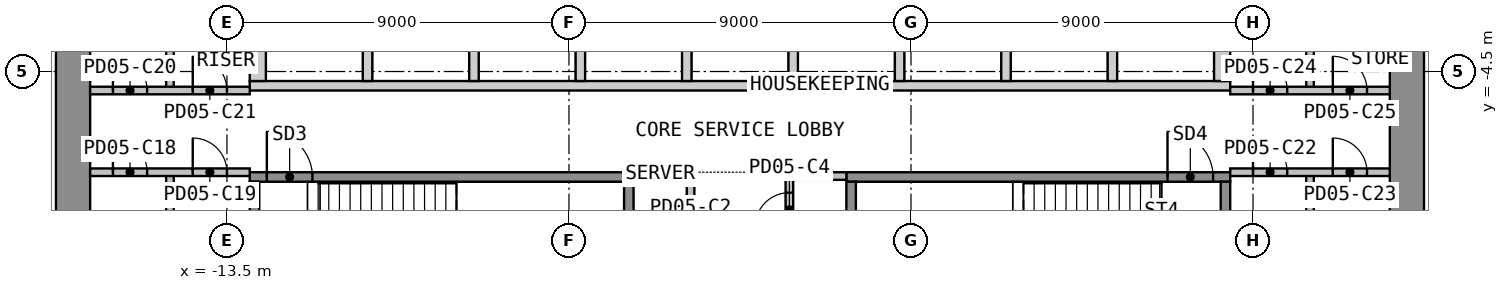
"""IFC4 building model, lengths in metres.
Left out: names, types, materials, properties, quantities, classifications, styles, units other than length and angle.
Written with IfcOpenShell. Run it as: python <this file> out.ifc"""

import sys

from ifc_helpers import new_model, si_unit, direction, frame, frame_2d, origin, place, context, subcontext, project, spatial, polyline, rectangle, outline, extrude, element, fill, save


model = new_model("IFC4")
c1 = context("Model", 3, precision=1e-05, world=origin(), true_north=direction((0.0, 1.0)))
c2 = subcontext(c1, "Body", "Model", "MODEL_VIEW")
j1 = project(units=[si_unit("LENGTHUNIT", "METRE"), si_unit("PLANEANGLEUNIT", "RADIAN")], contexts=[c1])
p1 = place(None, origin())
s1 = spatial("IfcSite", under=j1, at=p1, CompositionType="ELEMENT")
p2 = place(p1, origin())
s2 = spatial("IfcBuilding", under=s1, at=p2, CompositionType="ELEMENT")
p3 = place(p2, frame((0.0, 0.0, 25.2)))
s3 = spatial("IfcBuildingStorey", under=s2, at=p3, CompositionType="ELEMENT", Elevation=25.2)
p4 = place(p3, frame((-17.55, -12.6, 0.0), z_axis=(0.0, 0.0, 1.0), x_axis=(0.0, 1.0, 0.0)))
e1 = element("IfcWall", 1, at=p4, inside=s3, PredefinedType="SHEAR", context=c2, shape_type="SweptSolid", body=[
    extrude(rectangle(XDim=25.2, YDim=0.9, at=frame_2d((12.6, 0.0))), origin(), (0.0, 0.0, 1.0), 4.425),
])
p5 = place(p4, frame((11.4, 0.0, 0.0)))
e2 = element("IfcOpeningElement", 2, at=p5, cuts=e1, PredefinedType="OPENING", context=c2, shape_type="SweptSolid", body=[
    extrude(rectangle(XDim=2.4, YDim=2.1, at=frame_2d((1.2, 1.05))), frame((0.0, 0.46, 0.0), z_axis=(0.0, -1.0, 0.0), x_axis=(1.0, 0.0, 0.0)), (0.0, 0.0, 1.0), 0.92),
])
p6 = place(p3, frame((17.55, -12.6, 0.0), z_axis=(0.0, 0.0, 1.0), x_axis=(0.0, 1.0, 0.0)))
e3 = element("IfcWall", 3, at=p6, inside=s3, PredefinedType="SHEAR", context=c2, shape_type="SweptSolid", body=[
    extrude(rectangle(XDim=25.2, YDim=0.9, at=frame_2d((12.6, 0.0))), origin(), (0.0, 0.0, 1.0), 4.425),
])
p7 = place(p6, frame((11.4, 0.0, 0.0)))
e4 = element("IfcOpeningElement", 4, at=p7, cuts=e3, PredefinedType="OPENING", context=c2, shape_type="SweptSolid", body=[
    extrude(rectangle(XDim=2.4, YDim=2.1, at=frame_2d((1.2, 1.05))), frame((0.0, 0.46, 0.0), z_axis=(0.0, -1.0, 0.0), x_axis=(1.0, 0.0, 0.0)), (0.0, 0.0, 1.0), 0.92),
])
p8 = place(p3, origin())
e5 = element("IfcWall", 5, at=p8, inside=s3, PredefinedType="SHEAR", context=c2, shape_type="SweptSolid", body=[
    extrude(outline(polyline([(-12.9, -5.0), (12.9, -5.0), (12.9, -4.75), (-12.9, -4.75), (-12.9, -5.0)])), origin(), (0.0, 0.0, 1.0), 4.425),
])
p9 = place(p3, origin())
e6 = element("IfcWall", 6, at=p9, inside=s3, PredefinedType="SHEAR", context=c2, shape_type="SweptSolid", body=[
    extrude(outline(polyline([(-12.9, -4.75), (-12.475, -4.75), (-12.475, -2.05), (-12.9, -2.05), (-12.9, -4.75)])), origin(), (0.0, 0.0, 1.0), 4.425),
])
p10 = place(p3, origin())
e7 = element("IfcWall", 7, at=p10, inside=s3, PredefinedType="SHEAR", context=c2, shape_type="SweptSolid", body=[
    extrude(outline(polyline([(-9.925, -4.75), (-9.675, -4.75), (-9.675, -2.05), (-9.925, -2.05), (-9.925, -4.75)])), origin(), (0.0, 0.0, 1.0), 4.425),
])
p11 = place(p3, origin())
e8 = element("IfcWall", 8, at=p11, inside=s3, PredefinedType="SHEAR", context=c2, shape_type="SweptSolid", body=[
    extrude(outline(polyline([(-7.125, -4.75), (-6.875, -4.75), (-6.875, -2.05), (-7.125, -2.05), (-7.125, -4.75)])), origin(), (0.0, 0.0, 1.0), 4.425),
])
p12 = place(p3, origin())
e9 = element("IfcWall", 9, at=p12, inside=s3, PredefinedType="SHEAR", context=c2, shape_type="SweptSolid", body=[
    extrude(outline(polyline([(-4.325, -4.75), (-4.075, -4.75), (-4.075, -2.05), (-4.325, -2.05), (-4.325, -4.75)])), origin(), (0.0, 0.0, 1.0), 4.425),
])
p13 = place(p3, origin())
e10 = element("IfcWall", 10, at=p13, inside=s3, PredefinedType="SHEAR", context=c2, shape_type="SweptSolid", body=[
    extrude(outline(polyline([(-1.525, -4.75), (-1.275, -4.75), (-1.275, -2.05), (-1.525, -2.05), (-1.525, -4.75)])), origin(), (0.0, 0.0, 1.0), 4.425),
])
p14 = place(p3, origin())
e11 = element("IfcWall", 11, at=p14, inside=s3, PredefinedType="SHEAR", context=c2, shape_type="SweptSolid", body=[
    extrude(outline(polyline([(1.275, -4.75), (1.525, -4.75), (1.525, -2.05), (1.275, -2.05), (1.275, -4.75)])), origin(), (0.0, 0.0, 1.0), 4.425),
])
p15 = place(p3, origin())
e12 = element("IfcWall", 12, at=p15, inside=s3, PredefinedType="SHEAR", context=c2, shape_type="SweptSolid", body=[
    extrude(outline(polyline([(4.075, -4.75), (4.325, -4.75), (4.325, -2.05), (4.075, -2.05), (4.075, -4.75)])), origin(), (0.0, 0.0, 1.0), 4.425),
])
p16 = place(p3, origin())
e13 = element("IfcWall", 13, at=p16, inside=s3, PredefinedType="SHEAR", context=c2, shape_type="SweptSolid", body=[
    extrude(outline(polyline([(6.875, -4.75), (7.125, -4.75), (7.125, -2.05), (6.875, -2.05), (6.875, -4.75)])), origin(), (0.0, 0.0, 1.0), 4.425),
])
p17 = place(p3, origin())
e14 = element("IfcWall", 14, at=p17, inside=s3, PredefinedType="SHEAR", context=c2, shape_type="SweptSolid", body=[
    extrude(outline(polyline([(9.675, -4.75), (9.925, -4.75), (9.925, -2.05), (9.675, -2.05), (9.675, -4.75)])), origin(), (0.0, 0.0, 1.0), 4.425),
])
p18 = place(p3, origin())
e15 = element("IfcWall", 15, at=p18, inside=s3, PredefinedType="SHEAR", context=c2, shape_type="SweptSolid", body=[
    extrude(outline(polyline([(12.475, -4.75), (12.9, -4.75), (12.9, -2.05), (12.475, -2.05), (12.475, -4.75)])), origin(), (0.0, 0.0, 1.0), 4.425),
])
p19 = place(p3, frame((-12.9, -7.275, 0.0), z_axis=(0.0, 0.0, 1.0), x_axis=(1.0, 0.0, 0.0)))
e16 = element("IfcWall", 16, at=p19, inside=s3, PredefinedType="SHEAR", context=c2, shape_type="SweptSolid", body=[
    extrude(rectangle(XDim=10.1, YDim=0.25, at=frame_2d((5.05, 0.0))), origin(), (0.0, 0.0, 1.0), 4.425),
])
p20 = place(p19, frame((0.45, 0.0, 0.0)))
e17 = element("IfcOpeningElement", 17, at=p20, cuts=e16, PredefinedType="OPENING", context=c2, shape_type="SweptSolid", body=[
    extrude(rectangle(XDim=1.2, YDim=2.1, at=frame_2d((0.6, 1.05))), frame((0.0, 0.135, 0.0), z_axis=(0.0, -1.0, 0.0), x_axis=(1.0, 0.0, 0.0)), (0.0, 0.0, 1.0), 0.27),
])
for number, where, z_axis, x_axis in (
    (18, (-12.775, -10.65, 0.0), (0.0, 0.0, 1.0), (0.0, 1.0, 0.0)),
    (19, (-2.925, -10.65, 0.0), (0.0, 0.0, 1.0), (0.0, 1.0, 0.0)),
):
    element("IfcWall", number, at=place(p3, frame(where, z_axis=z_axis, x_axis=x_axis)), inside=s3, PredefinedType="SHEAR", context=c2, shape_type="SweptSolid", body=[
        extrude(rectangle(XDim=3.25, YDim=0.25, at=frame_2d((1.625, 0.0))), origin(), (0.0, 0.0, 1.0), 4.425),
    ])
p21 = place(p3, frame((2.8, -7.275, 0.0), z_axis=(0.0, 0.0, 1.0), x_axis=(1.0, 0.0, 0.0)))
e20 = element("IfcWall", 20, at=p21, inside=s3, PredefinedType="SHEAR", context=c2, shape_type="SweptSolid", body=[
    extrude(rectangle(XDim=10.1, YDim=0.25, at=frame_2d((5.05, 0.0))), origin(), (0.0, 0.0, 1.0), 4.425),
])
p22 = place(p21, frame((8.45, 0.0, 0.0)))
e21 = element("IfcOpeningElement", 21, at=p22, cuts=e20, PredefinedType="OPENING", context=c2, shape_type="SweptSolid", body=[
    extrude(rectangle(XDim=1.2, YDim=2.1, at=frame_2d((0.6, 1.05))), frame((0.0, 0.135, 0.0), z_axis=(0.0, -1.0, 0.0), x_axis=(1.0, 0.0, 0.0)), (0.0, 0.0, 1.0), 0.27),
])
for number, where, z_axis, x_axis in (
    (22, (2.925, -10.65, 0.0), (0.0, 0.0, 1.0), (0.0, 1.0, 0.0)),
    (23, (12.775, -10.65, 0.0), (0.0, 0.0, 1.0), (0.0, 1.0, 0.0)),
):
    element("IfcWall", number, at=place(p3, frame(where, z_axis=z_axis, x_axis=x_axis)), inside=s3, PredefinedType="SHEAR", context=c2, shape_type="SweptSolid", body=[
        extrude(rectangle(XDim=3.25, YDim=0.25, at=frame_2d((1.625, 0.0))), origin(), (0.0, 0.0, 1.0), 4.425),
    ])
for number, where, z_axis, x_axis in (
    (24, (-2.8, -7.25, 0.0), (0.0, 0.0, 1.0), (1.0, 0.0, 0.0)),
    (25, (1.4, -7.25, 0.0), (0.0, 0.0, 1.0), (1.0, 0.0, 0.0)),
):
    element("IfcWall", number, at=place(p3, frame(where, z_axis=z_axis, x_axis=x_axis)), inside=s3, PredefinedType="PARTITIONING", context=c2, shape_type="SweptSolid", body=[
        extrude(rectangle(XDim=1.4, YDim=0.2, at=frame_2d((0.7, 0.0))), origin(), (0.0, 0.0, 1.0), 4.425),
    ])
p23 = place(p3, frame((-1.3, -12.6, 0.0), z_axis=(0.0, 0.0, 1.0), x_axis=(0.0, 1.0, 0.0)))
e26 = element("IfcWall", 26, at=p23, inside=s3, PredefinedType="PARTITIONING", context=c2, shape_type="SweptSolid", body=[
    extrude(rectangle(XDim=5.45, YDim=0.2, at=frame_2d((2.725, 0.0))), origin(), (0.0, 0.0, 1.0), 4.425),
])
p24 = place(p23, frame((0.337, 0.0, 0.0)))
e27 = element("IfcOpeningElement", 27, at=p24, cuts=e26, PredefinedType="OPENING", context=c2, shape_type="SweptSolid", body=[
    extrude(rectangle(XDim=0.9, YDim=2.1, at=frame_2d((0.45, 1.05))), frame((0.0, 0.11, 0.0), z_axis=(0.0, -1.0, 0.0), x_axis=(1.0, 0.0, 0.0)), (0.0, 0.0, 1.0), 0.22),
])
p25 = place(p23, frame((2.962, 0.0, 0.0)))
e28 = element("IfcOpeningElement", 28, at=p25, cuts=e26, PredefinedType="OPENING", context=c2, shape_type="SweptSolid", body=[
    extrude(rectangle(XDim=0.9, YDim=2.1, at=frame_2d((0.45, 1.05))), frame((0.0, 0.11, 0.0), z_axis=(0.0, -1.0, 0.0), x_axis=(1.0, 0.0, 0.0)), (0.0, 0.0, 1.0), 0.22),
])
p26 = place(p3, frame((1.3, -12.6, 0.0), z_axis=(0.0, 0.0, 1.0), x_axis=(0.0, 1.0, 0.0)))
e29 = element("IfcWall", 29, at=p26, inside=s3, PredefinedType="PARTITIONING", context=c2, shape_type="SweptSolid", body=[
    extrude(rectangle(XDim=5.45, YDim=0.2, at=frame_2d((2.725, 0.0))), origin(), (0.0, 0.0, 1.0), 4.425),
])
p27 = place(p26, frame((1.387, 0.0, 0.0)))
e30 = element("IfcOpeningElement", 30, at=p27, cuts=e29, PredefinedType="OPENING", context=c2, shape_type="SweptSolid", body=[
    extrude(rectangle(XDim=0.9, YDim=2.1, at=frame_2d((0.45, 1.05))), frame((0.0, 0.11, 0.0), z_axis=(0.0, -1.0, 0.0), x_axis=(1.0, 0.0, 0.0)), (0.0, 0.0, 1.0), 0.22),
])
p28 = place(p26, frame((4.012, 0.0, 0.0)))
e31 = element("IfcOpeningElement", 31, at=p28, cuts=e29, PredefinedType="OPENING", context=c2, shape_type="SweptSolid", body=[
    extrude(rectangle(XDim=0.9, YDim=2.1, at=frame_2d((0.45, 1.05))), frame((0.0, 0.11, 0.0), z_axis=(0.0, -1.0, 0.0), x_axis=(1.0, 0.0, 0.0)), (0.0, 0.0, 1.0), 0.22),
])
p29 = place(p3, frame((-15.0, -12.6, 0.0), z_axis=(0.0, 0.0, 1.0), x_axis=(0.0, 1.0, 0.0)))
e32 = element("IfcWall", 32, at=p29, inside=s3, PredefinedType="PARTITIONING", context=c2, shape_type="SweptSolid", body=[
    extrude(rectangle(XDim=5.45, YDim=0.2, at=frame_2d((2.725, 0.0))), origin(), (0.0, 0.0, 1.0), 4.425),
])
p30 = place(p3, frame((-17.1, -7.15, 0.0), z_axis=(0.0, 0.0, 1.0), x_axis=(1.0, 0.0, 0.0)))
e33 = element("IfcWall", 33, at=p30, inside=s3, PredefinedType="PARTITIONING", context=c2, shape_type="SweptSolid", body=[
    extrude(rectangle(XDim=4.2, YDim=0.2, at=frame_2d((2.1, 0.0))), origin(), (0.0, 0.0, 1.0), 4.425),
])
p31 = place(p30, frame((0.6, 0.0, 0.0)))
e34 = element("IfcOpeningElement", 34, at=p31, cuts=e33, PredefinedType="OPENING", context=c2, shape_type="SweptSolid", body=[
    extrude(rectangle(XDim=0.9, YDim=2.1, at=frame_2d((0.45, 1.05))), frame((0.0, 0.11, 0.0), z_axis=(0.0, -1.0, 0.0), x_axis=(1.0, 0.0, 0.0)), (0.0, 0.0, 1.0), 0.22),
])
p32 = place(p30, frame((2.7, 0.0, 0.0)))
e35 = element("IfcOpeningElement", 35, at=p32, cuts=e33, PredefinedType="OPENING", context=c2, shape_type="SweptSolid", body=[
    extrude(rectangle(XDim=0.9, YDim=2.1, at=frame_2d((0.45, 1.05))), frame((0.0, 0.11, 0.0), z_axis=(0.0, -1.0, 0.0), x_axis=(1.0, 0.0, 0.0)), (0.0, 0.0, 1.0), 0.22),
])
p33 = place(p3, frame((-15.0, -5.0, 0.0), z_axis=(0.0, 0.0, 1.0), x_axis=(0.0, 1.0, 0.0)))
e36 = element("IfcWall", 36, at=p33, inside=s3, PredefinedType="PARTITIONING", context=c2, shape_type="SweptSolid", body=[
    extrude(rectangle(XDim=3.2, YDim=0.2, at=frame_2d((1.6, 0.0))), origin(), (0.0, 0.0, 1.0), 4.425),
])
p34 = place(p3, frame((-17.1, -5.0, 0.0), z_axis=(0.0, 0.0, 1.0), x_axis=(1.0, 0.0, 0.0)))
e37 = element("IfcWall", 37, at=p34, inside=s3, PredefinedType="PARTITIONING", context=c2, shape_type="SweptSolid", body=[
    extrude(rectangle(XDim=4.2, YDim=0.2, at=frame_2d((2.1, 0.0))), origin(), (0.0, 0.0, 1.0), 4.425),
])
p35 = place(p34, frame((0.6, 0.0, 0.0)))
e38 = element("IfcOpeningElement", 38, at=p35, cuts=e37, PredefinedType="OPENING", context=c2, shape_type="SweptSolid", body=[
    extrude(rectangle(XDim=0.9, YDim=2.1, at=frame_2d((0.45, 1.05))), frame((0.0, 0.11, 0.0), z_axis=(0.0, -1.0, 0.0), x_axis=(1.0, 0.0, 0.0)), (0.0, 0.0, 1.0), 0.22),
])
p36 = place(p34, frame((2.7, 0.0, 0.0)))
e39 = element("IfcOpeningElement", 39, at=p36, cuts=e37, PredefinedType="OPENING", context=c2, shape_type="SweptSolid", body=[
    extrude(rectangle(XDim=0.9, YDim=2.1, at=frame_2d((0.45, 1.05))), frame((0.0, 0.11, 0.0), z_axis=(0.0, -1.0, 0.0), x_axis=(1.0, 0.0, 0.0)), (0.0, 0.0, 1.0), 0.22),
])
p37 = place(p3, frame((15.0, -12.6, 0.0), z_axis=(0.0, 0.0, 1.0), x_axis=(0.0, 1.0, 0.0)))
e40 = element("IfcWall", 40, at=p37, inside=s3, PredefinedType="PARTITIONING", context=c2, shape_type="SweptSolid", body=[
    extrude(rectangle(XDim=5.45, YDim=0.2, at=frame_2d((2.725, 0.0))), origin(), (0.0, 0.0, 1.0), 4.425),
])
p38 = place(p3, frame((12.9, -7.15, 0.0), z_axis=(0.0, 0.0, 1.0), x_axis=(1.0, 0.0, 0.0)))
e41 = element("IfcWall", 41, at=p38, inside=s3, PredefinedType="PARTITIONING", context=c2, shape_type="SweptSolid", body=[
    extrude(rectangle(XDim=4.2, YDim=0.2, at=frame_2d((2.1, 0.0))), origin(), (0.0, 0.0, 1.0), 4.425),
])
p39 = place(p38, frame((0.6, 0.0, 0.0)))
e42 = element("IfcOpeningElement", 42, at=p39, cuts=e41, PredefinedType="OPENING", context=c2, shape_type="SweptSolid", body=[
    extrude(rectangle(XDim=0.9, YDim=2.1, at=frame_2d((0.45, 1.05))), frame((0.0, 0.11, 0.0), z_axis=(0.0, -1.0, 0.0), x_axis=(1.0, 0.0, 0.0)), (0.0, 0.0, 1.0), 0.22),
])
p40 = place(p38, frame((2.7, 0.0, 0.0)))
e43 = element("IfcOpeningElement", 43, at=p40, cuts=e41, PredefinedType="OPENING", context=c2, shape_type="SweptSolid", body=[
    extrude(rectangle(XDim=0.9, YDim=2.1, at=frame_2d((0.45, 1.05))), frame((0.0, 0.11, 0.0), z_axis=(0.0, -1.0, 0.0), x_axis=(1.0, 0.0, 0.0)), (0.0, 0.0, 1.0), 0.22),
])
p41 = place(p3, frame((15.0, -5.0, 0.0), z_axis=(0.0, 0.0, 1.0), x_axis=(0.0, 1.0, 0.0)))
e44 = element("IfcWall", 44, at=p41, inside=s3, PredefinedType="PARTITIONING", context=c2, shape_type="SweptSolid", body=[
    extrude(rectangle(XDim=3.2, YDim=0.2, at=frame_2d((1.6, 0.0))), origin(), (0.0, 0.0, 1.0), 4.425),
])
p42 = place(p3, frame((12.9, -5.0, 0.0), z_axis=(0.0, 0.0, 1.0), x_axis=(1.0, 0.0, 0.0)))
e45 = element("IfcWall", 45, at=p42, inside=s3, PredefinedType="PARTITIONING", context=c2, shape_type="SweptSolid", body=[
    extrude(rectangle(XDim=4.2, YDim=0.2, at=frame_2d((2.1, 0.0))), origin(), (0.0, 0.0, 1.0), 4.425),
])
p43 = place(p42, frame((0.6, 0.0, 0.0)))
e46 = element("IfcOpeningElement", 46, at=p43, cuts=e45, PredefinedType="OPENING", context=c2, shape_type="SweptSolid", body=[
    extrude(rectangle(XDim=0.9, YDim=2.1, at=frame_2d((0.45, 1.05))), frame((0.0, 0.11, 0.0), z_axis=(0.0, -1.0, 0.0), x_axis=(1.0, 0.0, 0.0)), (0.0, 0.0, 1.0), 0.22),
])
p44 = place(p42, frame((2.7, 0.0, 0.0)))
e47 = element("IfcOpeningElement", 47, at=p44, cuts=e45, PredefinedType="OPENING", context=c2, shape_type="SweptSolid", body=[
    extrude(rectangle(XDim=0.9, YDim=2.1, at=frame_2d((0.45, 1.05))), frame((0.0, 0.11, 0.0), z_axis=(0.0, -1.0, 0.0), x_axis=(1.0, 0.0, 0.0)), (0.0, 0.0, 1.0), 0.22),
])
p45 = place(p20, origin())
e48 = element("IfcDoor", 48, at=p45, inside=s3, OperationType="SINGLE_SWING_LEFT", PredefinedType="DOOR", context=c2, shape_type="SweptSolid", body=[
    extrude(rectangle(XDim=1.2, YDim=2.1, at=frame_2d((0.6, 1.05))), frame((0.0, 0.025, 0.0), z_axis=(0.0, -1.0, 0.0), x_axis=(1.0, 0.0, 0.0)), (0.0, 0.0, 1.0), 0.05),
])
fill(e17, e48)
p46 = place(p22, origin())
e49 = element("IfcDoor", 49, at=p46, inside=s3, OperationType="SINGLE_SWING_LEFT", PredefinedType="DOOR", context=c2, shape_type="SweptSolid", body=[
    extrude(rectangle(XDim=1.2, YDim=2.1, at=frame_2d((0.6, 1.05))), frame((0.0, 0.025, 0.0), z_axis=(0.0, -1.0, 0.0), x_axis=(1.0, 0.0, 0.0)), (0.0, 0.0, 1.0), 0.05),
])
fill(e21, e49)
p47 = place(p28, origin())
e50 = element("IfcDoor", 50, at=p47, inside=s3, OperationType="SINGLE_SWING_LEFT", PredefinedType="DOOR", context=c2, shape_type="SweptSolid", body=[
    extrude(rectangle(XDim=0.9, YDim=2.1, at=frame_2d((0.45, 1.05))), frame((0.0, 0.025, 0.0), z_axis=(0.0, -1.0, 0.0), x_axis=(1.0, 0.0, 0.0)), (0.0, 0.0, 1.0), 0.05),
])
fill(e31, e50)
p48 = place(p31, origin())
e51 = element("IfcDoor", 51, at=p48, inside=s3, OperationType="SINGLE_SWING_LEFT", PredefinedType="DOOR", context=c2, shape_type="SweptSolid", body=[
    extrude(rectangle(XDim=0.9, YDim=2.1, at=frame_2d((0.45, 1.05))), frame((0.0, 0.025, 0.0), z_axis=(0.0, -1.0, 0.0), x_axis=(1.0, 0.0, 0.0)), (0.0, 0.0, 1.0), 0.05),
])
fill(e34, e51)
p49 = place(p32, origin())
e52 = element("IfcDoor", 52, at=p49, inside=s3, OperationType="SINGLE_SWING_LEFT", PredefinedType="DOOR", context=c2, shape_type="SweptSolid", body=[
    extrude(rectangle(XDim=0.9, YDim=2.1, at=frame_2d((0.45, 1.05))), frame((0.0, 0.025, 0.0), z_axis=(0.0, -1.0, 0.0), x_axis=(1.0, 0.0, 0.0)), (0.0, 0.0, 1.0), 0.05),
])
fill(e35, e52)
p50 = place(p35, origin())
e53 = element("IfcDoor", 53, at=p50, inside=s3, OperationType="SINGLE_SWING_LEFT", PredefinedType="DOOR", context=c2, shape_type="SweptSolid", body=[
    extrude(rectangle(XDim=0.9, YDim=2.1, at=frame_2d((0.45, 1.05))), frame((0.0, 0.025, 0.0), z_axis=(0.0, -1.0, 0.0), x_axis=(1.0, 0.0, 0.0)), (0.0, 0.0, 1.0), 0.05),
])
fill(e38, e53)
p51 = place(p36, origin())
e54 = element("IfcDoor", 54, at=p51, inside=s3, OperationType="SINGLE_SWING_LEFT", PredefinedType="DOOR", context=c2, shape_type="SweptSolid", body=[
    extrude(rectangle(XDim=0.9, YDim=2.1, at=frame_2d((0.45, 1.05))), frame((0.0, 0.025, 0.0), z_axis=(0.0, -1.0, 0.0), x_axis=(1.0, 0.0, 0.0)), (0.0, 0.0, 1.0), 0.05),
])
fill(e39, e54)
p52 = place(p39, origin())
e55 = element("IfcDoor", 55, at=p52, inside=s3, OperationType="SINGLE_SWING_LEFT", PredefinedType="DOOR", context=c2, shape_type="SweptSolid", body=[
    extrude(rectangle(XDim=0.9, YDim=2.1, at=frame_2d((0.45, 1.05))), frame((0.0, 0.025, 0.0), z_axis=(0.0, -1.0, 0.0), x_axis=(1.0, 0.0, 0.0)), (0.0, 0.0, 1.0), 0.05),
])
fill(e42, e55)
p53 = place(p40, origin())
e56 = element("IfcDoor", 56, at=p53, inside=s3, OperationType="SINGLE_SWING_LEFT", PredefinedType="DOOR", context=c2, shape_type="SweptSolid", body=[
    extrude(rectangle(XDim=0.9, YDim=2.1, at=frame_2d((0.45, 1.05))), frame((0.0, 0.025, 0.0), z_axis=(0.0, -1.0, 0.0), x_axis=(1.0, 0.0, 0.0)), (0.0, 0.0, 1.0), 0.05),
])
fill(e43, e56)
p54 = place(p43, origin())
e57 = element("IfcDoor", 57, at=p54, inside=s3, OperationType="SINGLE_SWING_LEFT", PredefinedType="DOOR", context=c2, shape_type="SweptSolid", body=[
    extrude(rectangle(XDim=0.9, YDim=2.1, at=frame_2d((0.45, 1.05))), frame((0.0, 0.025, 0.0), z_axis=(0.0, -1.0, 0.0), x_axis=(1.0, 0.0, 0.0)), (0.0, 0.0, 1.0), 0.05),
])
fill(e46, e57)
p55 = place(p44, origin())
e58 = element("IfcDoor", 58, at=p55, inside=s3, OperationType="SINGLE_SWING_LEFT", PredefinedType="DOOR", context=c2, shape_type="SweptSolid", body=[
    extrude(rectangle(XDim=0.9, YDim=2.1, at=frame_2d((0.45, 1.05))), frame((0.0, 0.025, 0.0), z_axis=(0.0, -1.0, 0.0), x_axis=(1.0, 0.0, 0.0)), (0.0, 0.0, 1.0), 0.05),
])
fill(e47, e58)
save(model, sys.argv[1])
